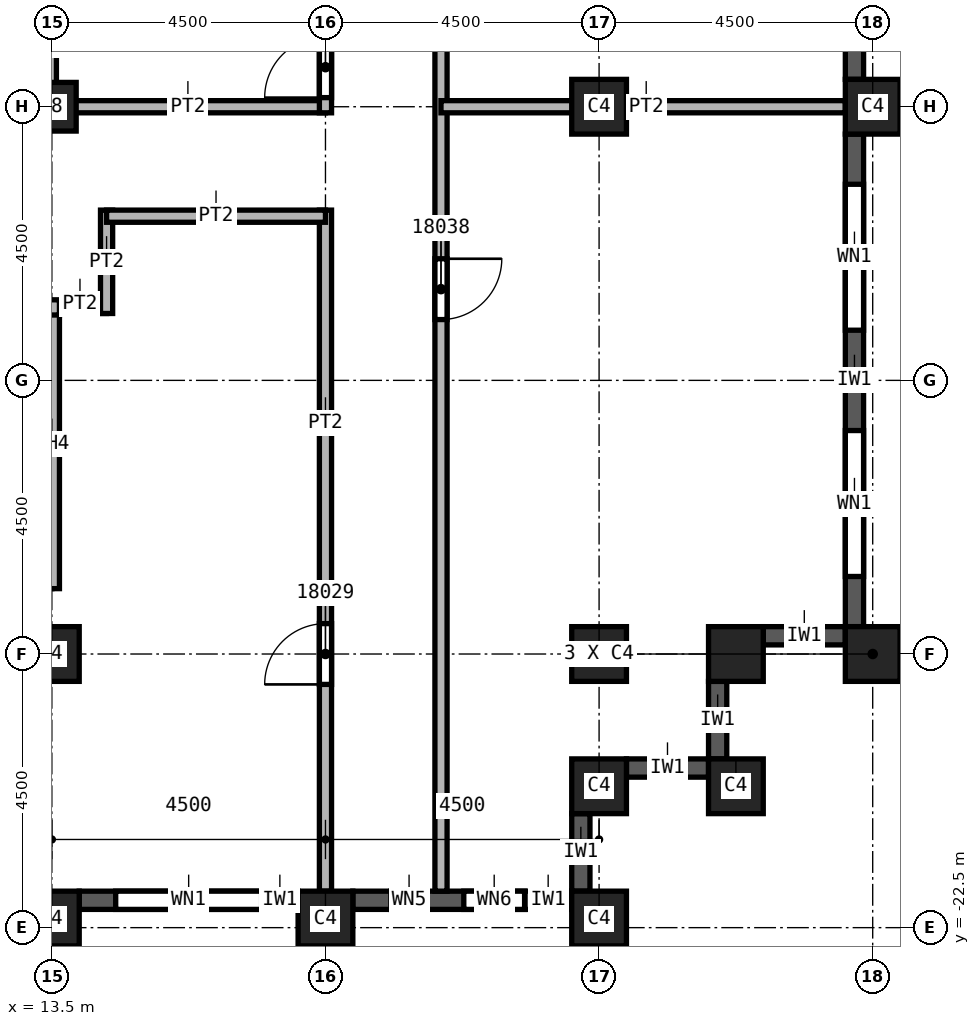
"""IFC4 building model, lengths in metres.
Left out: names, types, materials, properties, quantities, classifications, styles, units other than length and angle.
Written with IfcOpenShell. Run it as: python <this file> out.ifc"""

import sys

from ifc_helpers import new_model, si_unit, direction, frame, frame_2d, origin, origin_2d, place, context, subcontext, project, spatial, rectangle, extrude, element, fill, save


model = new_model("IFC4")
c1 = context("Model", 3, precision=1e-05, world=origin(), true_north=direction((0.0, 1.0)))
c2 = subcontext(c1, "Body", "Model", "MODEL_VIEW")
j1 = project(units=[si_unit("LENGTHUNIT", "METRE"), si_unit("PLANEANGLEUNIT", "RADIAN")], contexts=[c1])
p1 = place(None, origin())
s1 = spatial("IfcSite", under=j1, at=p1, CompositionType="ELEMENT")
p2 = place(p1, origin())
s2 = spatial("IfcBuilding", under=s1, at=p2, CompositionType="ELEMENT")
p3 = place(p2, frame((0.0, 0.0, 266.0)))
s3 = spatial("IfcBuildingStorey", under=s2, at=p3, CompositionType="ELEMENT", Elevation=266.0)
for number, where, z_axis, x_axis in (
    (1, (13.5, -18.0, 0.0), (0.0, 0.0, 1.0), (1.0, 0.0, 0.0)),
    (2, (22.5, -9.0, 0.0), (0.0, 0.0, 1.0), (1.0, 0.0, 0.0)),
    (3, (22.5, -18.0, 0.0), (0.0, 0.0, 1.0), (1.0, 0.0, 0.0)),
):
    element("IfcColumn", number, at=place(p3, frame(where, z_axis=z_axis, x_axis=x_axis)), inside=s3, PredefinedType="COLUMN", context=c2, shape_type="SweptSolid", body=[
        extrude(rectangle(XDim=0.9, YDim=0.9, at=origin_2d()), origin(), (0.0, 0.0, 1.0), 3.72),
    ])
p4 = place(p3, frame((13.5, -9.0, 0.0), z_axis=(0.0, 0.0, 1.0), x_axis=(1.0, 0.0, 0.0)))
e4 = element("IfcColumn", 4, at=p4, inside=s3, PredefinedType="COLUMN", context=c2, shape_type="SweptSolid", body=[
    extrude(rectangle(XDim=0.8, YDim=0.8, at=origin_2d()), origin(), (0.0, 0.0, 1.0), 3.72),
])
for number, where, z_axis, x_axis in (
    (5, (27.0, -9.0, 0.0), (0.0, 0.0, 1.0), (0.0, 1.0, 0.0)),
    (6, (27.0, -18.0, 0.0), (0.0, 0.0, 1.0), (0.0, 1.0, 0.0)),
    (7, (13.5, -22.35, 0.0), (0.0, 0.0, 1.0), (1.0, 0.0, 0.0)),
    (8, (18.0, -22.35, 0.0), (0.0, 0.0, 1.0), (1.0, 0.0, 0.0)),
    (9, (22.5, -22.35, 0.0), (0.0, 0.0, 1.0), (1.0, 0.0, 0.0)),
    (10, (22.5, -20.175, 0.0), (0.0, 0.0, 1.0), (1.0, 0.0, 0.0)),
    (11, (24.75, -20.175, 0.0), (0.0, 0.0, 1.0), (1.0, 0.0, 0.0)),
    (12, (24.75, -18.0, 0.0), (0.0, 0.0, 1.0), (1.0, 0.0, 0.0)),
):
    element("IfcColumn", number, at=place(p3, frame(where, z_axis=z_axis, x_axis=x_axis)), inside=s3, PredefinedType="COLUMN", context=c2, shape_type="SweptSolid", body=[
        extrude(rectangle(XDim=0.9, YDim=0.9, at=origin_2d()), origin(), (0.0, 0.0, 1.0), 3.72),
    ])
p5 = place(p3, frame((13.95, -22.05, 0.0), z_axis=(0.0, 0.0, 1.0), x_axis=(1.0, 0.0, 0.0)))
e13 = element("IfcWall", 13, at=p5, inside=s3, PredefinedType="SOLIDWALL", context=c2, shape_type="SweptSolid", body=[
    extrude(rectangle(XDim=3.6, YDim=0.3, at=frame_2d((1.8, 0.0))), origin(), (0.0, 0.0, 1.0), 3.12),
])
p6 = place(p5, frame((0.6, 0.0, 0.8)))
e14 = element("IfcOpeningElement", 14, at=p6, cuts=e13, PredefinedType="OPENING", context=c2, shape_type="SweptSolid", body=[
    extrude(rectangle(XDim=2.4, YDim=1.95, at=frame_2d((1.2, 0.975))), frame((0.0, 0.15, 0.0), z_axis=(0.0, -1.0, 0.0), x_axis=(1.0, 0.0, 0.0)), (0.0, 0.0, 1.0), 0.3),
])
p7 = place(p3, frame((18.45, -22.05, 0.0), z_axis=(0.0, 0.0, 1.0), x_axis=(1.0, 0.0, 0.0)))
e15 = element("IfcWall", 15, at=p7, inside=s3, PredefinedType="SOLIDWALL", context=c2, shape_type="SweptSolid", body=[
    extrude(rectangle(XDim=3.6, YDim=0.3, at=frame_2d((1.8, 0.0))), origin(), (0.0, 0.0, 1.0), 3.12),
])
p8 = place(p7, frame((0.625, 0.0, 0.8)))
e16 = element("IfcOpeningElement", 16, at=p8, cuts=e15, PredefinedType="OPENING", context=c2, shape_type="SweptSolid", body=[
    extrude(rectangle(XDim=0.6, YDim=1.95, at=frame_2d((0.3, 0.975))), frame((0.0, 0.15, 0.0), z_axis=(0.0, -1.0, 0.0), x_axis=(1.0, 0.0, 0.0)), (0.0, 0.0, 1.0), 0.3),
])
p9 = place(p7, frame((1.825, 0.0, 0.8)))
e17 = element("IfcOpeningElement", 17, at=p9, cuts=e15, PredefinedType="OPENING", context=c2, shape_type="SweptSolid", body=[
    extrude(rectangle(XDim=1.0, YDim=1.95, at=frame_2d((0.5, 0.975))), frame((0.0, 0.15, 0.0), z_axis=(0.0, -1.0, 0.0), x_axis=(1.0, 0.0, 0.0)), (0.0, 0.0, 1.0), 0.3),
])
p10 = place(p3, frame((22.2, -21.9, 0.0), z_axis=(0.0, 0.0, 1.0), x_axis=(0.0, 1.0, 0.0)))
e18 = element("IfcWall", 18, at=p10, inside=s3, PredefinedType="SOLIDWALL", context=c2, shape_type="SweptSolid", body=[
    extrude(rectangle(XDim=1.275, YDim=0.3, at=frame_2d((0.637, 0.0))), origin(), (0.0, 0.0, 1.0), 3.12),
])
p11 = place(p3, frame((22.95, -19.875, 0.0), z_axis=(0.0, 0.0, 1.0), x_axis=(1.0, 0.0, 0.0)))
e19 = element("IfcWall", 19, at=p11, inside=s3, PredefinedType="SOLIDWALL", context=c2, shape_type="SweptSolid", body=[
    extrude(rectangle(XDim=1.35, YDim=0.3, at=frame_2d((0.675, 0.0))), origin(), (0.0, 0.0, 1.0), 3.12),
])
p12 = place(p3, frame((24.45, -19.725, 0.0), z_axis=(0.0, 0.0, 1.0), x_axis=(0.0, 1.0, 0.0)))
e20 = element("IfcWall", 20, at=p12, inside=s3, PredefinedType="SOLIDWALL", context=c2, shape_type="SweptSolid", body=[
    extrude(rectangle(XDim=1.275, YDim=0.3, at=frame_2d((0.638, 0.0))), origin(), (0.0, 0.0, 1.0), 3.12),
])
p13 = place(p3, frame((25.2, -17.7, 0.0), z_axis=(0.0, 0.0, 1.0), x_axis=(1.0, 0.0, 0.0)))
e21 = element("IfcWall", 21, at=p13, inside=s3, PredefinedType="SOLIDWALL", context=c2, shape_type="SweptSolid", body=[
    extrude(rectangle(XDim=1.35, YDim=0.3, at=frame_2d((0.675, 0.0))), origin(), (0.0, 0.0, 1.0), 3.12),
])
p14 = place(p3, frame((26.7, -17.55, 0.0), z_axis=(0.0, 0.0, 1.0), x_axis=(0.0, 1.0, 0.0)))
e22 = element("IfcWall", 22, at=p14, inside=s3, PredefinedType="SOLIDWALL", context=c2, shape_type="SweptSolid", body=[
    extrude(rectangle(XDim=8.1, YDim=0.3, at=frame_2d((4.05, 0.0))), origin(), (0.0, 0.0, 1.0), 3.12),
])
p15 = place(p14, frame((0.825, 0.0, 0.8)))
e23 = element("IfcOpeningElement", 23, at=p15, cuts=e22, PredefinedType="OPENING", context=c2, shape_type="SweptSolid", body=[
    extrude(rectangle(XDim=2.4, YDim=1.95, at=frame_2d((1.2, 0.975))), frame((0.0, 0.15, 0.0), z_axis=(0.0, -1.0, 0.0), x_axis=(1.0, 0.0, 0.0)), (0.0, 0.0, 1.0), 0.3),
])
p16 = place(p14, frame((4.875, 0.0, 0.8)))
e24 = element("IfcOpeningElement", 24, at=p16, cuts=e22, PredefinedType="OPENING", context=c2, shape_type="SweptSolid", body=[
    extrude(rectangle(XDim=2.4, YDim=1.95, at=frame_2d((1.2, 0.975))), frame((0.0, 0.15, 0.0), z_axis=(0.0, -1.0, 0.0), x_axis=(1.0, 0.0, 0.0)), (0.0, 0.0, 1.0), 0.3),
])
p17 = place(p3, frame((26.7, -8.55, 0.0), z_axis=(0.0, 0.0, 1.0), x_axis=(0.0, 1.0, 0.0)))
e25 = element("IfcWall", 25, at=p17, inside=s3, PredefinedType="SOLIDWALL", context=c2, shape_type="SweptSolid", body=[
    extrude(rectangle(XDim=8.1, YDim=0.3, at=frame_2d((4.05, 0.0))), origin(), (0.0, 0.0, 1.0), 3.12),
])
p18 = place(p17, frame((0.825, 0.0, 0.8)))
e26 = element("IfcOpeningElement", 26, at=p18, cuts=e25, PredefinedType="OPENING", context=c2, shape_type="SweptSolid", body=[
    extrude(rectangle(XDim=2.4, YDim=1.95, at=frame_2d((1.2, 0.975))), frame((0.0, 0.15, 0.0), z_axis=(0.0, -1.0, 0.0), x_axis=(1.0, 0.0, 0.0)), (0.0, 0.0, 1.0), 0.3),
])
p19 = place(p17, frame((4.875, 0.0, 0.8)))
e27 = element("IfcOpeningElement", 27, at=p19, cuts=e25, PredefinedType="OPENING", context=c2, shape_type="SweptSolid", body=[
    extrude(rectangle(XDim=2.4, YDim=1.95, at=frame_2d((1.2, 0.975))), frame((0.0, 0.15, 0.0), z_axis=(0.0, -1.0, 0.0), x_axis=(1.0, 0.0, 0.0)), (0.0, 0.0, 1.0), 0.3),
])
p20 = place(p3, frame((13.5, -9.0, 0.0), z_axis=(0.0, 0.0, 1.0), x_axis=(1.0, 0.0, 0.0)))
e28 = element("IfcWall", 28, at=p20, inside=s3, PredefinedType="PARTITIONING", context=c2, shape_type="SweptSolid", body=[
    extrude(rectangle(XDim=4.5, YDim=0.2, at=frame_2d((2.25, 0.0))), origin(), (0.0, 0.0, 1.0), 3.72),
])
p21 = place(p3, frame((14.4, -12.3, 0.0), z_axis=(0.0, 0.0, 1.0), x_axis=(-1.0, 0.0, 0.0)))
e29 = element("IfcWall", 29, at=p21, inside=s3, PredefinedType="PARTITIONING", context=c2, shape_type="SweptSolid", body=[
    extrude(rectangle(XDim=1.025, YDim=0.2, at=frame_2d((0.512, 0.0))), origin(), (0.0, 0.0, 1.0), 3.72),
])
p22 = place(p3, frame((14.4, -10.7, 0.0), z_axis=(0.0, 0.0, 1.0), x_axis=(0.0, -1.0, 0.0)))
e30 = element("IfcWall", 30, at=p22, inside=s3, PredefinedType="PARTITIONING", context=c2, shape_type="SweptSolid", body=[
    extrude(rectangle(XDim=1.7, YDim=0.2, at=frame_2d((0.85, 0.0))), origin(), (0.0, 0.0, 1.0), 3.72),
])
p23 = place(p3, frame((18.0, -21.9, 0.0), z_axis=(0.0, 0.0, 1.0), x_axis=(0.0, 1.0, 0.0)))
e31 = element("IfcWall", 31, at=p23, inside=s3, PredefinedType="PARTITIONING", context=c2, shape_type="SweptSolid", body=[
    extrude(rectangle(XDim=11.2, YDim=0.2, at=frame_2d((5.6, 0.0))), origin(), (0.0, 0.0, 1.0), 3.72),
])
p24 = place(p23, frame((3.4, 0.0, 0.0)))
e32 = element("IfcOpeningElement", 32, at=p24, cuts=e31, PredefinedType="OPENING", context=c2, shape_type="SweptSolid", body=[
    extrude(rectangle(XDim=1.0, YDim=2.1, at=frame_2d((0.5, 1.05))), frame((0.0, 0.1, 0.0), z_axis=(0.0, -1.0, 0.0), x_axis=(1.0, 0.0, 0.0)), (0.0, 0.0, 1.0), 0.2),
])
p25 = place(p3, frame((18.0, -10.8, 0.0), z_axis=(0.0, 0.0, 1.0), x_axis=(-1.0, 0.0, 0.0)))
e33 = element("IfcWall", 33, at=p25, inside=s3, PredefinedType="PARTITIONING", context=c2, shape_type="SweptSolid", body=[
    extrude(rectangle(XDim=3.6, YDim=0.2, at=frame_2d((1.8, 0.0))), origin(), (0.0, 0.0, 1.0), 3.72),
])
p26 = place(p3, frame((18.0, -9.1, 0.0), z_axis=(0.0, 0.0, 1.0), x_axis=(0.0, 1.0, 0.0)))
e34 = element("IfcWall", 34, at=p26, inside=s3, PredefinedType="PARTITIONING", context=c2, shape_type="SweptSolid", body=[
    extrude(rectangle(XDim=18.2, YDim=0.2, at=frame_2d((9.1, 0.0))), origin(), (0.0, 0.0, 1.0), 3.72),
])
p27 = place(p26, frame((0.25, 0.0, 0.0)))
e35 = element("IfcOpeningElement", 35, at=p27, cuts=e34, PredefinedType="OPENING", context=c2, shape_type="SweptSolid", body=[
    extrude(rectangle(XDim=1.0, YDim=2.1, at=frame_2d((0.5, 1.05))), frame((0.0, 0.1, 0.0), z_axis=(0.0, -1.0, 0.0), x_axis=(1.0, 0.0, 0.0)), (0.0, 0.0, 1.0), 0.2),
])
p28 = place(p26, frame((14.65, 0.0, 0.0)))
e36 = element("IfcOpeningElement", 36, at=p28, cuts=e34, PredefinedType="OPENING", context=c2, shape_type="SweptSolid", body=[
    extrude(rectangle(XDim=1.0, YDim=2.1, at=frame_2d((0.5, 1.05))), frame((0.0, 0.1, 0.0), z_axis=(0.0, -1.0, 0.0), x_axis=(1.0, 0.0, 0.0)), (0.0, 0.0, 1.0), 0.2),
])
p29 = place(p3, frame((19.9, 21.9, 0.0), z_axis=(0.0, 0.0, 1.0), x_axis=(0.0, -1.0, 0.0)))
e37 = element("IfcWall", 37, at=p29, inside=s3, PredefinedType="PARTITIONING", context=c2, shape_type="SweptSolid", body=[
    extrude(rectangle(XDim=43.8, YDim=0.2, at=frame_2d((21.9, 0.0))), origin(), (0.0, 0.0, 1.0), 3.72),
])
p30 = place(p29, frame((9.55, 0.0, 0.0)))
e38 = element("IfcOpeningElement", 38, at=p30, cuts=e37, PredefinedType="OPENING", context=c2, shape_type="SweptSolid", body=[
    extrude(rectangle(XDim=1.0, YDim=2.1, at=frame_2d((0.5, 1.05))), frame((0.0, 0.1, 0.0), z_axis=(0.0, -1.0, 0.0), x_axis=(1.0, 0.0, 0.0)), (0.0, 0.0, 1.0), 0.2),
])
p31 = place(p29, frame((33.4, 0.0, 0.0)))
e39 = element("IfcOpeningElement", 39, at=p31, cuts=e37, PredefinedType="OPENING", context=c2, shape_type="SweptSolid", body=[
    extrude(rectangle(XDim=1.0, YDim=2.1, at=frame_2d((0.5, 1.05))), frame((0.0, 0.1, 0.0), z_axis=(0.0, -1.0, 0.0), x_axis=(1.0, 0.0, 0.0)), (0.0, 0.0, 1.0), 0.2),
])
p32 = place(p29, frame((28.65, 0.0, 0.0)))
e40 = element("IfcOpeningElement", 40, at=p32, cuts=e37, PredefinedType="OPENING", context=c2, shape_type="SweptSolid", body=[
    extrude(rectangle(XDim=1.0, YDim=2.1, at=frame_2d((0.5, 1.05))), frame((0.0, 0.1, 0.0), z_axis=(0.0, -1.0, 0.0), x_axis=(1.0, 0.0, 0.0)), (0.0, 0.0, 1.0), 0.2),
])
p33 = place(p3, frame((19.9, -9.0, 0.0), z_axis=(0.0, 0.0, 1.0), x_axis=(1.0, 0.0, 0.0)))
e41 = element("IfcWall", 41, at=p33, inside=s3, PredefinedType="PARTITIONING", context=c2, shape_type="SweptSolid", body=[
    extrude(rectangle(XDim=6.65, YDim=0.2, at=frame_2d((3.325, 0.0))), origin(), (0.0, 0.0, 1.0), 3.72),
])
p34 = place(p3, frame((13.5, -12.3, 0.0), z_axis=(0.0, 0.0, 1.0), x_axis=(0.0, -1.0, 0.0)))
e42 = element("IfcWall", 42, at=p34, inside=s3, PredefinedType="SOLIDWALL", context=c2, shape_type="SweptSolid", body=[
    extrude(rectangle(XDim=4.625, YDim=0.25, at=frame_2d((2.312, 0.0))), origin(), (0.0, 0.0, 1.0), 3.72),
])
p35 = place(p3, frame((13.625, -12.3, 0.0), z_axis=(0.0, 0.0, 1.0), x_axis=(-1.0, 0.0, 0.0)))
e43 = element("IfcWall", 43, at=p35, inside=s3, PredefinedType="SOLIDWALL", context=c2, shape_type="SweptSolid", body=[
    extrude(rectangle(XDim=9.25, YDim=0.25, at=frame_2d((4.625, 0.0))), origin(), (0.0, 0.0, 1.0), 3.72),
])
p36 = place(p35, frame((0.85, 0.0, 0.0)))
e44 = element("IfcOpeningElement", 44, at=p36, cuts=e43, PredefinedType="OPENING", context=c2, shape_type="SweptSolid", body=[
    extrude(rectangle(XDim=1.2, YDim=2.1, at=frame_2d((0.6, 1.05))), frame((0.0, 0.125, 0.0), z_axis=(0.0, -1.0, 0.0), x_axis=(1.0, 0.0, 0.0)), (0.0, 0.0, 1.0), 0.25),
])
p37 = place(p3, frame((13.5, -7.0, 0.0), z_axis=(0.0, 0.0, 1.0), x_axis=(0.0, -1.0, 0.0)))
e45 = element("IfcWall", 45, at=p37, inside=s3, PredefinedType="PARTITIONING", context=c2, shape_type="SweptSolid", body=[
    extrude(rectangle(XDim=2.1, YDim=0.15, at=frame_2d((1.05, 0.0))), origin(), (0.0, 0.0, 1.0), 3.042),
])
p38 = place(p3, frame((13.575, -9.0, 0.0), z_axis=(0.0, 0.0, 1.0), x_axis=(-1.0, 0.0, 0.0)))
e46 = element("IfcWall", 46, at=p38, inside=s3, PredefinedType="PARTITIONING", context=c2, shape_type="SweptSolid", body=[
    extrude(rectangle(XDim=3.075, YDim=0.15, at=frame_2d((1.538, 0.0))), origin(), (0.0, 0.0, 1.0), 3.042),
])
p39 = place(p38, frame((1.9, 0.0, 0.0)))
e47 = element("IfcOpeningElement", 47, at=p39, cuts=e46, PredefinedType="OPENING", context=c2, shape_type="SweptSolid", body=[
    extrude(rectangle(XDim=0.9, YDim=2.1, at=frame_2d((0.45, 1.05))), frame((0.0, 0.075, 0.0), z_axis=(0.0, -1.0, 0.0), x_axis=(1.0, 0.0, 0.0)), (0.0, 0.0, 1.0), 0.15),
])
p40 = place(p6, origin())
e48 = element("IfcWindow", 48, at=p40, inside=s3, PartitioningType="SINGLE_PANEL", PredefinedType="WINDOW", context=c2, shape_type="SweptSolid", body=[
    extrude(rectangle(XDim=2.4, YDim=1.95, at=frame_2d((1.2, 0.975))), frame((0.0, 0.03, 0.0), z_axis=(0.0, -1.0, 0.0), x_axis=(1.0, 0.0, 0.0)), (0.0, 0.0, 1.0), 0.06),
])
fill(e14, e48)
p41 = place(p15, origin())
e49 = element("IfcWindow", 49, at=p41, inside=s3, PartitioningType="SINGLE_PANEL", PredefinedType="WINDOW", context=c2, shape_type="SweptSolid", body=[
    extrude(rectangle(XDim=2.4, YDim=1.95, at=frame_2d((1.2, 0.975))), frame((0.0, 0.03, 0.0), z_axis=(0.0, -1.0, 0.0), x_axis=(1.0, 0.0, 0.0)), (0.0, 0.0, 1.0), 0.06),
])
fill(e23, e49)
p42 = place(p16, origin())
e50 = element("IfcWindow", 50, at=p42, inside=s3, PartitioningType="SINGLE_PANEL", PredefinedType="WINDOW", context=c2, shape_type="SweptSolid", body=[
    extrude(rectangle(XDim=2.4, YDim=1.95, at=frame_2d((1.2, 0.975))), frame((0.0, 0.03, 0.0), z_axis=(0.0, -1.0, 0.0), x_axis=(1.0, 0.0, 0.0)), (0.0, 0.0, 1.0), 0.06),
])
fill(e24, e50)
p43 = place(p27, origin())
e51 = element("IfcDoor", 51, at=p43, inside=s3, OperationType="SINGLE_SWING_LEFT", PredefinedType="DOOR", context=c2, shape_type="SweptSolid", body=[
    extrude(rectangle(XDim=1.0, YDim=2.1, at=frame_2d((0.5, 1.05))), frame((0.0, 0.025, 0.0), z_axis=(0.0, -1.0, 0.0), x_axis=(1.0, 0.0, 0.0)), (0.0, 0.0, 1.0), 0.05),
])
fill(e35, e51)
p44 = place(p24, origin())
e52 = element("IfcDoor", 52, at=p44, inside=s3, OperationType="SINGLE_SWING_RIGHT", PredefinedType="DOOR", context=c2, shape_type="SweptSolid", body=[
    extrude(rectangle(XDim=1.0, YDim=2.1, at=frame_2d((0.5, 1.05))), frame((0.0, 0.025, 0.0), z_axis=(0.0, -1.0, 0.0), x_axis=(1.0, 0.0, 0.0)), (0.0, 0.0, 1.0), 0.05),
])
fill(e32, e52)
p45 = place(p31, origin())
e53 = element("IfcDoor", 53, at=p45, inside=s3, OperationType="SINGLE_SWING_LEFT", PredefinedType="DOOR", context=c2, shape_type="SweptSolid", body=[
    extrude(rectangle(XDim=1.0, YDim=2.1, at=frame_2d((0.5, 1.05))), frame((0.0, 0.025, 0.0), z_axis=(0.0, -1.0, 0.0), x_axis=(1.0, 0.0, 0.0)), (0.0, 0.0, 1.0), 0.05),
])
fill(e39, e53)
p46 = place(p8, origin())
e54 = element("IfcWindow", 54, at=p46, inside=s3, PartitioningType="SINGLE_PANEL", PredefinedType="WINDOW", context=c2, shape_type="SweptSolid", body=[
    extrude(rectangle(XDim=0.6, YDim=1.95, at=frame_2d((0.3, 0.975))), frame((0.0, 0.03, 0.0), z_axis=(0.0, -1.0, 0.0), x_axis=(1.0, 0.0, 0.0)), (0.0, 0.0, 1.0), 0.06),
])
fill(e16, e54)
p47 = place(p9, origin())
e55 = element("IfcWindow", 55, at=p47, inside=s3, PartitioningType="SINGLE_PANEL", PredefinedType="WINDOW", context=c2, shape_type="SweptSolid", body=[
    extrude(rectangle(XDim=1.0, YDim=1.95, at=frame_2d((0.5, 0.975))), frame((0.0, 0.03, 0.0), z_axis=(0.0, -1.0, 0.0), x_axis=(1.0, 0.0, 0.0)), (0.0, 0.0, 1.0), 0.06),
])
fill(e17, e55)
save(model, sys.argv[1])
